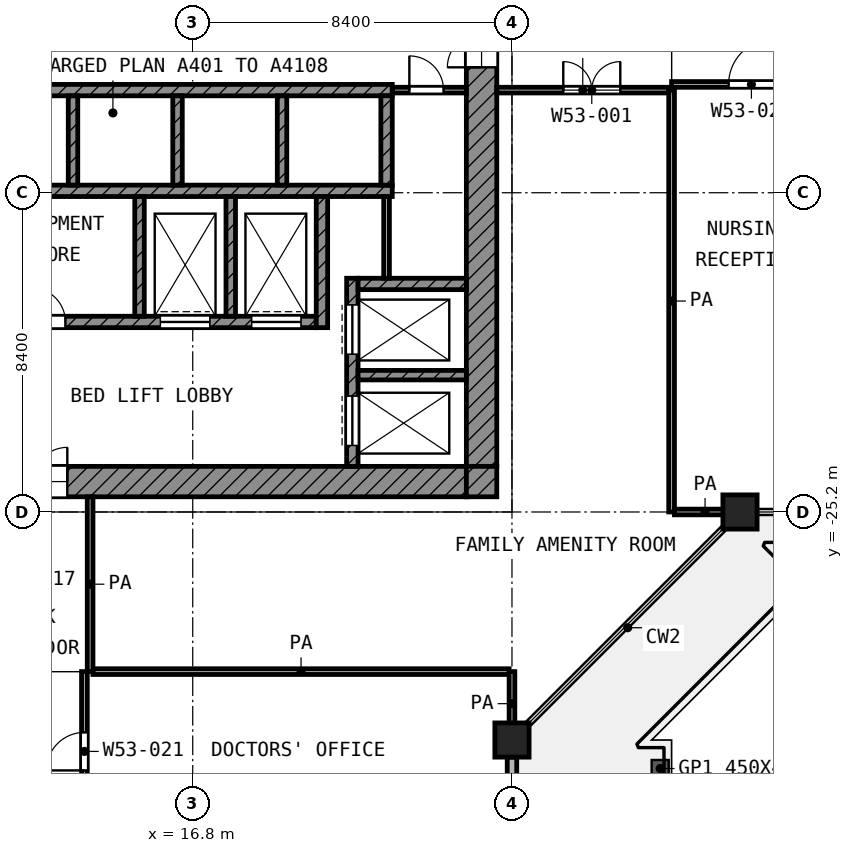
"""IFC4 building model, lengths in metres.
Left out: names, types, materials, properties, quantities, classifications, styles, units other than length and angle.
Written with IfcOpenShell. Run it as: python <this file> out.ifc"""

import sys

from ifc_helpers import new_model, si_unit, direction, frame, frame_2d, origin, origin_2d, place, context, subcontext, project, spatial, rectangle, extrude, element, fill, save


model = new_model("IFC4")
c1 = context("Model", 3, precision=1e-05, world=origin(), true_north=direction((0.0, 1.0)))
c2 = subcontext(c1, "Body", "Model", "MODEL_VIEW")
j1 = project(units=[si_unit("LENGTHUNIT", "METRE"), si_unit("PLANEANGLEUNIT", "RADIAN")], contexts=[c1])
p1 = place(None, origin())
s1 = spatial("IfcSite", under=j1, at=p1, CompositionType="ELEMENT")
p2 = place(p1, origin())
s2 = spatial("IfcBuilding", under=s1, at=p2, CompositionType="ELEMENT")
p3 = place(p2, frame((0.0, 0.0, 230.6)))
s3 = spatial("IfcBuildingStorey", under=s2, at=p3, CompositionType="ELEMENT", Elevation=230.6)
for number, where, z_axis, x_axis in (
    (1, (31.2, -25.2, 0.0), (0.0, 0.0, 1.0), (1.0, 0.0, 0.0)),
    (2, (25.2, -31.2, 0.0), (0.0, 0.0, 1.0), (1.0, 0.0, 0.0)),
):
    element("IfcColumn", number, at=place(p3, frame(where, z_axis=z_axis, x_axis=x_axis)), inside=s3, PredefinedType="COLUMN", context=c2, shape_type="SweptSolid", body=[
        extrude(rectangle(XDim=0.9, YDim=0.9, at=origin_2d()), origin(), (0.0, 0.0, 1.0), 4.2),
    ])
p4 = place(p3, frame((25.2, -35.7, 0.0), z_axis=(0.0, 0.0, 1.0), x_axis=(0.0, 1.0, 0.0)))
e3 = element("IfcWall", 3, at=p4, inside=s3, PredefinedType="SOLIDWALL", context=c2, shape_type="SweptSolid", body=[
    extrude(rectangle(XDim=4.05, YDim=0.25, at=frame_2d((2.025, 0.0))), origin(), (0.0, 0.0, 1.0), 2.58),
])
p5 = place(p4, frame((0.825, 0.0, 0.0)))
e4 = element("IfcOpeningElement", 4, at=p5, cuts=e3, PredefinedType="OPENING", context=c2, shape_type="SweptSolid", body=[
    extrude(rectangle(XDim=1.0, YDim=2.1, at=frame_2d((0.5, 1.05))), frame((0.0, 0.135, 0.0), z_axis=(0.0, -1.0, 0.0), x_axis=(1.0, 0.0, 0.0)), (0.0, 0.0, 1.0), 0.27),
])
p6 = place(p3, frame((24.4, -24.0, 0.0), z_axis=(0.0, 0.0, 1.0), x_axis=(0.0, 1.0, 0.0)))
e5 = element("IfcWall", 5, at=p6, inside=s3, PredefinedType="SHEAR", context=c2, shape_type="SweptSolid", body=[
    extrude(rectangle(XDim=18.6, YDim=0.8, at=frame_2d((9.3, 0.0))), origin(), (0.0, 0.0, 1.0), 3.6),
])
p7 = place(p6, frame((10.5, 0.0, 0.0)))
e6 = element("IfcOpeningElement", 6, at=p7, cuts=e5, PredefinedType="OPENING", context=c2, shape_type="SweptSolid", body=[
    extrude(rectangle(XDim=1.8, YDim=2.1, at=frame_2d((0.9, 1.05))), frame((0.0, 0.41, 0.0), z_axis=(0.0, -1.0, 0.0), x_axis=(1.0, 0.0, 0.0)), (0.0, 0.0, 1.0), 0.82),
])
p8 = place(p3, frame((5.4, -24.4, 0.0), z_axis=(0.0, 0.0, 1.0), x_axis=(1.0, 0.0, 0.0)))
e7 = element("IfcWall", 7, at=p8, inside=s3, PredefinedType="SHEAR", context=c2, shape_type="SweptSolid", body=[
    extrude(rectangle(XDim=18.6, YDim=0.8, at=frame_2d((9.3, 0.0))), origin(), (0.0, 0.0, 1.0), 3.6),
])
p9 = place(p8, frame((6.3, 0.0, 0.0)))
e8 = element("IfcOpeningElement", 8, at=p9, cuts=e7, PredefinedType="OPENING", context=c2, shape_type="SweptSolid", body=[
    extrude(rectangle(XDim=1.8, YDim=2.1, at=frame_2d((0.9, 1.05))), frame((0.0, 0.41, 0.0), z_axis=(0.0, -1.0, 0.0), x_axis=(1.0, 0.0, 0.0)), (0.0, 0.0, 1.0), 0.82),
])
p10 = place(p3, frame((24.4, -24.8, 0.0), z_axis=(0.0, 0.0, 1.0), x_axis=(0.0, 1.0, 0.0)))
e9 = element("IfcWall", 9, at=p10, inside=s3, PredefinedType="SHEAR", context=c2, shape_type="SweptSolid", body=[
    extrude(rectangle(XDim=0.8, YDim=0.8, at=frame_2d((0.4, 0.0))), origin(), (0.0, 0.0, 1.0), 3.6),
])
p11 = place(p3, frame((5.4, -14.1, 0.0), z_axis=(0.0, 0.0, 1.0), x_axis=(1.0, 0.0, 0.0)))
e10 = element("IfcWall", 10, at=p11, inside=s3, PredefinedType="SHEAR", context=c2, shape_type="SweptSolid", body=[
    extrude(rectangle(XDim=16.65, YDim=0.3, at=frame_2d((8.325, 0.0))), origin(), (0.0, 0.0, 1.0), 3.6),
])
p12 = place(p11, frame((0.825, 0.0, 0.0)))
e11 = element("IfcOpeningElement", 11, at=p12, cuts=e10, PredefinedType="OPENING", context=c2, shape_type="SweptSolid", body=[
    extrude(rectangle(XDim=1.1, YDim=2.1, at=frame_2d((0.55, 1.05))), frame((0.0, 0.16, 0.0), z_axis=(0.0, -1.0, 0.0), x_axis=(1.0, 0.0, 0.0)), (0.0, 0.0, 1.0), 0.32),
])
p13 = place(p11, frame((3.575, 0.0, 0.0)))
e12 = element("IfcOpeningElement", 12, at=p13, cuts=e10, PredefinedType="OPENING", context=c2, shape_type="SweptSolid", body=[
    extrude(rectangle(XDim=1.1, YDim=2.1, at=frame_2d((0.55, 1.05))), frame((0.0, 0.16, 0.0), z_axis=(0.0, -1.0, 0.0), x_axis=(1.0, 0.0, 0.0)), (0.0, 0.0, 1.0), 0.32),
])
p14 = place(p3, frame((5.4, -16.75, 0.0), z_axis=(0.0, 0.0, 1.0), x_axis=(1.0, 0.0, 0.0)))
e13 = element("IfcWall", 13, at=p14, inside=s3, PredefinedType="SHEAR", context=c2, shape_type="SweptSolid", body=[
    extrude(rectangle(XDim=16.65, YDim=0.3, at=frame_2d((8.325, 0.0))), origin(), (0.0, 0.0, 1.0), 3.6),
])
p15 = place(p3, frame((5.4, -20.2, 0.0), z_axis=(0.0, 0.0, 1.0), x_axis=(1.0, 0.0, 0.0)))
e14 = element("IfcWall", 14, at=p15, inside=s3, PredefinedType="SHEAR", context=c2, shape_type="SweptSolid", body=[
    extrude(rectangle(XDim=14.65, YDim=0.3, at=frame_2d((7.325, 0.0))), origin(), (0.0, 0.0, 1.0), 3.6),
])
p16 = place(p15, frame((10.55, 0.0, 0.0)))
e15 = element("IfcOpeningElement", 15, at=p16, cuts=e14, PredefinedType="OPENING", context=c2, shape_type="SweptSolid", body=[
    extrude(rectangle(XDim=1.3, YDim=2.1, at=frame_2d((0.65, 1.05))), frame((0.0, 0.16, 0.0), z_axis=(0.0, -1.0, 0.0), x_axis=(1.0, 0.0, 0.0)), (0.0, 0.0, 1.0), 0.32),
])
p17 = place(p15, frame((12.95, 0.0, 0.0)))
e16 = element("IfcOpeningElement", 16, at=p17, cuts=e14, PredefinedType="OPENING", context=c2, shape_type="SweptSolid", body=[
    extrude(rectangle(XDim=1.3, YDim=2.1, at=frame_2d((0.65, 1.05))), frame((0.0, 0.16, 0.0), z_axis=(0.0, -1.0, 0.0), x_axis=(1.0, 0.0, 0.0)), (0.0, 0.0, 1.0), 0.32),
])
p18 = place(p15, frame((0.55, 0.0, 0.0)))
e17 = element("IfcOpeningElement", 17, at=p18, cuts=e14, PredefinedType="OPENING", context=c2, shape_type="SweptSolid", body=[
    extrude(rectangle(XDim=1.3, YDim=2.1, at=frame_2d((0.65, 1.05))), frame((0.0, 0.16, 0.0), z_axis=(0.0, -1.0, 0.0), x_axis=(1.0, 0.0, 0.0)), (0.0, 0.0, 1.0), 0.32),
])
p19 = place(p15, frame((2.95, 0.0, 0.0)))
e18 = element("IfcOpeningElement", 18, at=p19, cuts=e14, PredefinedType="OPENING", context=c2, shape_type="SweptSolid", body=[
    extrude(rectangle(XDim=1.3, YDim=2.1, at=frame_2d((0.65, 1.05))), frame((0.0, 0.16, 0.0), z_axis=(0.0, -1.0, 0.0), x_axis=(1.0, 0.0, 0.0)), (0.0, 0.0, 1.0), 0.32),
])
p20 = place(p15, frame((7.15, 0.0, 0.0)))
e19 = element("IfcOpeningElement", 19, at=p20, cuts=e14, PredefinedType="OPENING", context=c2, shape_type="SweptSolid", body=[
    extrude(rectangle(XDim=0.9, YDim=2.1, at=frame_2d((0.45, 1.05))), frame((0.0, 0.16, 0.0), z_axis=(0.0, -1.0, 0.0), x_axis=(1.0, 0.0, 0.0)), (0.0, 0.0, 1.0), 0.32),
])
p21 = place(p3, frame((20.2, -20.35, 0.0), z_axis=(0.0, 0.0, 1.0), x_axis=(0.0, 1.0, 0.0)))
e20 = element("IfcWall", 20, at=p21, inside=s3, PredefinedType="SHEAR", context=c2, shape_type="SweptSolid", body=[
    extrude(rectangle(XDim=3.45, YDim=0.3, at=frame_2d((1.725, 0.0))), origin(), (0.0, 0.0, 1.0), 3.6),
])
p22 = place(p3, frame((21.9, -16.6, 0.0), z_axis=(0.0, 0.0, 1.0), x_axis=(0.0, 1.0, 0.0)))
e21 = element("IfcWall", 21, at=p22, inside=s3, PredefinedType="SHEAR", context=c2, shape_type="SweptSolid", body=[
    extrude(rectangle(XDim=2.35, YDim=0.3, at=frame_2d((1.175, 0.0))), origin(), (0.0, 0.0, 1.0), 3.6),
])
p23 = place(p3, frame((21.15, -19.2, 0.0), z_axis=(0.0, 0.0, 1.0), x_axis=(1.0, 0.0, 0.0)))
e22 = element("IfcWall", 22, at=p23, inside=s3, PredefinedType="SHEAR", context=c2, shape_type="SweptSolid", body=[
    extrude(rectangle(XDim=2.85, YDim=0.3, at=frame_2d((1.425, 0.0))), origin(), (0.0, 0.0, 1.0), 3.6),
])
p24 = place(p3, frame((21.0, -24.0, 0.0), z_axis=(0.0, 0.0, 1.0), x_axis=(0.0, 1.0, 0.0)))
e23 = element("IfcWall", 23, at=p24, inside=s3, PredefinedType="SHEAR", context=c2, shape_type="SweptSolid", body=[
    extrude(rectangle(XDim=4.95, YDim=0.3, at=frame_2d((2.475, 0.0))), origin(), (0.0, 0.0, 1.0), 3.6),
])
p25 = place(p24, frame((2.95, 0.0, 0.0)))
e24 = element("IfcOpeningElement", 24, at=p25, cuts=e23, PredefinedType="OPENING", context=c2, shape_type="SweptSolid", body=[
    extrude(rectangle(XDim=1.3, YDim=2.1, at=frame_2d((0.65, 1.05))), frame((0.0, 0.16, 0.0), z_axis=(0.0, -1.0, 0.0), x_axis=(1.0, 0.0, 0.0)), (0.0, 0.0, 1.0), 0.32),
])
p26 = place(p24, frame((0.55, 0.0, 0.0)))
e25 = element("IfcOpeningElement", 25, at=p26, cuts=e23, PredefinedType="OPENING", context=c2, shape_type="SweptSolid", body=[
    extrude(rectangle(XDim=1.3, YDim=2.1, at=frame_2d((0.65, 1.05))), frame((0.0, 0.16, 0.0), z_axis=(0.0, -1.0, 0.0), x_axis=(1.0, 0.0, 0.0)), (0.0, 0.0, 1.0), 0.32),
])
p27 = place(p3, frame((21.15, -21.6, 0.0), z_axis=(0.0, 0.0, 1.0), x_axis=(1.0, 0.0, 0.0)))
e26 = element("IfcWall", 26, at=p27, inside=s3, PredefinedType="SHEAR", context=c2, shape_type="SweptSolid", body=[
    extrude(rectangle(XDim=2.85, YDim=0.25, at=frame_2d((1.425, 0.0))), origin(), (0.0, 0.0, 1.0), 3.6),
])
for number, where, z_axis, x_axis in (
    (27, (15.4, -20.05, 0.0), (0.0, 0.0, 1.0), (0.0, 1.0, 0.0)),
    (28, (17.8, -20.05, 0.0), (0.0, 0.0, 1.0), (0.0, 1.0, 0.0)),
):
    element("IfcWall", number, at=place(p3, frame(where, z_axis=z_axis, x_axis=x_axis)), inside=s3, PredefinedType="SHEAR", context=c2, shape_type="SweptSolid", body=[
        extrude(rectangle(XDim=3.15, YDim=0.25, at=frame_2d((1.575, 0.0))), origin(), (0.0, 0.0, 1.0), 3.6),
    ])
for number, where, z_axis, x_axis in (
    (29, (13.65, -16.6, 0.0), (0.0, 0.0, 1.0), (0.0, 1.0, 0.0)),
    (30, (16.4, -16.6, 0.0), (0.0, 0.0, 1.0), (0.0, 1.0, 0.0)),
    (31, (19.15, -16.6, 0.0), (0.0, 0.0, 1.0), (0.0, 1.0, 0.0)),
):
    element("IfcWall", number, at=place(p3, frame(where, z_axis=z_axis, x_axis=x_axis)), inside=s3, PredefinedType="SHEAR", context=c2, shape_type="SweptSolid", body=[
        extrude(rectangle(XDim=2.35, YDim=0.25, at=frame_2d((1.175, 0.0))), origin(), (0.0, 0.0, 1.0), 3.6),
    ])
p28 = place(p3, frame((21.9, -19.05, 0.0), z_axis=(0.0, 0.0, 1.0), x_axis=(0.0, 1.0, 0.0)))
e32 = element("IfcWall", 32, at=p28, inside=s3, PredefinedType="PARTITIONING", context=c2, shape_type="SweptSolid", body=[
    extrude(rectangle(XDim=2.15, YDim=0.15, at=frame_2d((1.075, 0.0))), origin(), (0.0, 0.0, 1.0), 3.6),
])
p29 = place(p3, frame((22.05, -14.1, 0.0), z_axis=(0.0, 0.0, 1.0), x_axis=(1.0, 0.0, 0.0)))
e33 = element("IfcWall", 33, at=p29, inside=s3, PredefinedType="PARTITIONING", context=c2, shape_type="SweptSolid", body=[
    extrude(rectangle(XDim=1.95, YDim=0.15, at=frame_2d((0.975, 0.0))), origin(), (0.0, 0.0, 1.0), 3.6),
])
p30 = place(p29, frame((0.45, 0.0, 0.0)))
e34 = element("IfcOpeningElement", 34, at=p30, cuts=e33, PredefinedType="OPENING", context=c2, shape_type="SweptSolid", body=[
    extrude(rectangle(XDim=0.9, YDim=2.1, at=frame_2d((0.45, 1.05))), frame((0.0, 0.085, 0.0), z_axis=(0.0, -1.0, 0.0), x_axis=(1.0, 0.0, 0.0)), (0.0, 0.0, 1.0), 0.17),
])
p31 = place(p3, frame((14.175, -29.4, 0.0), z_axis=(0.0, 0.0, 1.0), x_axis=(1.0, 0.0, 0.0)))
e35 = element("IfcWall", 35, at=p31, inside=s3, PredefinedType="PARTITIONING", context=c2, shape_type="SweptSolid", body=[
    extrude(rectangle(XDim=10.95, YDim=0.15, at=frame_2d((5.475, 0.0))), origin(), (0.0, 0.0, 1.0), 3.6),
])
p32 = place(p3, frame((29.475, -25.2, 0.0), z_axis=(0.0, 0.0, 1.0), x_axis=(1.0, 0.0, 0.0)))
e36 = element("IfcWall", 36, at=p32, inside=s3, PredefinedType="PARTITIONING", context=c2, shape_type="SweptSolid", body=[
    extrude(rectangle(XDim=1.612, YDim=0.15, at=frame_2d((0.806, 0.0))), origin(), (0.0, 0.0, 1.0), 3.6),
])
p33 = place(p3, frame((24.8, -14.1, 0.0), z_axis=(0.0, 0.0, 1.0), x_axis=(1.0, 0.0, 0.0)))
e37 = element("IfcWall", 37, at=p33, inside=s3, PredefinedType="PARTITIONING", context=c2, shape_type="SweptSolid", body=[
    extrude(rectangle(XDim=4.525, YDim=0.15, at=frame_2d((2.262, 0.0))), origin(), (0.0, 0.0, 1.0), 3.6),
])
p34 = place(p33, frame((1.75, 0.0, 0.0)))
e38 = element("IfcOpeningElement", 38, at=p34, cuts=e37, PredefinedType="OPENING", context=c2, shape_type="SweptSolid", body=[
    extrude(rectangle(XDim=1.5, YDim=2.1, at=frame_2d((0.75, 1.05))), frame((0.0, 0.085, 0.0), z_axis=(0.0, -1.0, 0.0), x_axis=(1.0, 0.0, 0.0)), (0.0, 0.0, 1.0), 0.17),
])
p35 = place(p3, frame((29.4, -13.95, 0.0), z_axis=(0.0, 0.0, 1.0), x_axis=(1.0, 0.0, 0.0)))
e39 = element("IfcWall", 39, at=p35, inside=s3, PredefinedType="PARTITIONING", context=c2, shape_type="SweptSolid", body=[
    extrude(rectangle(XDim=33.52, YDim=0.15, at=frame_2d((16.76, 0.0))), origin(), (0.0, 0.0, 1.0), 2.7),
])
p36 = place(p35, frame((1.5, 0.0, 0.0)))
e40 = element("IfcOpeningElement", 40, at=p36, cuts=e39, PredefinedType="OPENING", context=c2, shape_type="SweptSolid", body=[
    extrude(rectangle(XDim=1.2, YDim=2.1, at=frame_2d((0.6, 1.05))), frame((0.0, 0.085, 0.0), z_axis=(0.0, -1.0, 0.0), x_axis=(1.0, 0.0, 0.0)), (0.0, 0.0, 1.0), 0.17),
])
p37 = place(p35, frame((6.1, 0.0, 0.0)))
e41 = element("IfcOpeningElement", 41, at=p37, cuts=e39, PredefinedType="OPENING", context=c2, shape_type="SweptSolid", body=[
    extrude(rectangle(XDim=1.0, YDim=2.1, at=frame_2d((0.5, 1.05))), frame((0.0, 0.085, 0.0), z_axis=(0.0, -1.0, 0.0), x_axis=(1.0, 0.0, 0.0)), (0.0, 0.0, 1.0), 0.17),
])
p38 = place(p35, frame((11.3, 0.0, 0.0)))
e42 = element("IfcOpeningElement", 42, at=p38, cuts=e39, PredefinedType="OPENING", context=c2, shape_type="SweptSolid", body=[
    extrude(rectangle(XDim=1.1, YDim=2.1, at=frame_2d((0.55, 1.05))), frame((0.0, 0.085, 0.0), z_axis=(0.0, -1.0, 0.0), x_axis=(1.0, 0.0, 0.0)), (0.0, 0.0, 1.0), 0.17),
])
p39 = place(p35, frame((13.0, 0.0, 0.0)))
e43 = element("IfcOpeningElement", 43, at=p39, cuts=e39, PredefinedType="OPENING", context=c2, shape_type="SweptSolid", body=[
    extrude(rectangle(XDim=1.2, YDim=2.1, at=frame_2d((0.6, 1.05))), frame((0.0, 0.085, 0.0), z_axis=(0.0, -1.0, 0.0), x_axis=(1.0, 0.0, 0.0)), (0.0, 0.0, 1.0), 0.17),
])
p40 = place(p35, frame((22.6, 0.0, 0.0)))
e44 = element("IfcOpeningElement", 44, at=p40, cuts=e39, PredefinedType="OPENING", context=c2, shape_type="SweptSolid", body=[
    extrude(rectangle(XDim=1.2, YDim=2.1, at=frame_2d((0.6, 1.05))), frame((0.0, 0.085, 0.0), z_axis=(0.0, -1.0, 0.0), x_axis=(1.0, 0.0, 0.0)), (0.0, 0.0, 1.0), 0.17),
])
p41 = place(p35, frame((20.3, 0.0, 0.0)))
e45 = element("IfcOpeningElement", 45, at=p41, cuts=e39, PredefinedType="OPENING", context=c2, shape_type="SweptSolid", body=[
    extrude(rectangle(XDim=1.2, YDim=2.1, at=frame_2d((0.6, 1.05))), frame((0.0, 0.085, 0.0), z_axis=(0.0, -1.0, 0.0), x_axis=(1.0, 0.0, 0.0)), (0.0, 0.0, 1.0), 0.17),
])
p42 = place(p35, frame((28.0, 0.0, 0.0)))
e46 = element("IfcOpeningElement", 46, at=p42, cuts=e39, PredefinedType="OPENING", context=c2, shape_type="SweptSolid", body=[
    extrude(rectangle(XDim=1.2, YDim=2.1, at=frame_2d((0.6, 1.05))), frame((0.0, 0.085, 0.0), z_axis=(0.0, -1.0, 0.0), x_axis=(1.0, 0.0, 0.0)), (0.0, 0.0, 1.0), 0.17),
])
p43 = place(p35, frame((31.0, 0.0, 0.0)))
e47 = element("IfcOpeningElement", 47, at=p43, cuts=e39, PredefinedType="OPENING", context=c2, shape_type="SweptSolid", body=[
    extrude(rectangle(XDim=1.0, YDim=2.1, at=frame_2d((0.5, 1.05))), frame((0.0, 0.085, 0.0), z_axis=(0.0, -1.0, 0.0), x_axis=(1.0, 0.0, 0.0)), (0.0, 0.0, 1.0), 0.17),
])
p44 = place(p3, frame((13.95, -46.12, 0.0), z_axis=(0.0, 0.0, 1.0), x_axis=(0.0, 1.0, 0.0)))
e48 = element("IfcWall", 48, at=p44, inside=s3, PredefinedType="PARTITIONING", context=c2, shape_type="SweptSolid", body=[
    extrude(rectangle(XDim=16.72, YDim=0.15, at=frame_2d((8.36, 0.0))), origin(), (0.0, 0.0, 1.0), 3.6),
])
p45 = place(p44, frame((14.12, 0.0, 0.0)))
e49 = element("IfcOpeningElement", 49, at=p45, cuts=e48, PredefinedType="OPENING", context=c2, shape_type="SweptSolid", body=[
    extrude(rectangle(XDim=1.0, YDim=2.1, at=frame_2d((0.5, 1.05))), frame((0.0, 0.085, 0.0), z_axis=(0.0, -1.0, 0.0), x_axis=(1.0, 0.0, 0.0)), (0.0, 0.0, 1.0), 0.17),
])
p46 = place(p44, frame((9.92, 0.0, 0.0)))
e50 = element("IfcOpeningElement", 50, at=p46, cuts=e48, PredefinedType="OPENING", context=c2, shape_type="SweptSolid", body=[
    extrude(rectangle(XDim=1.0, YDim=2.1, at=frame_2d((0.5, 1.05))), frame((0.0, 0.085, 0.0), z_axis=(0.0, -1.0, 0.0), x_axis=(1.0, 0.0, 0.0)), (0.0, 0.0, 1.0), 0.17),
])
p47 = place(p44, frame((3.37, 0.0, 0.0)))
e51 = element("IfcOpeningElement", 51, at=p47, cuts=e48, PredefinedType="OPENING", context=c2, shape_type="SweptSolid", body=[
    extrude(rectangle(XDim=1.5, YDim=2.1, at=frame_2d((0.75, 1.05))), frame((0.0, 0.085, 0.0), z_axis=(0.0, -1.0, 0.0), x_axis=(1.0, 0.0, 0.0)), (0.0, 0.0, 1.0), 0.17),
])
p48 = place(p3, frame((14.1, -29.4, 0.0), z_axis=(0.0, 0.0, 1.0), x_axis=(0.0, 1.0, 0.0)))
e52 = element("IfcWall", 52, at=p48, inside=s3, PredefinedType="PARTITIONING", context=c2, shape_type="SweptSolid", body=[
    extrude(rectangle(XDim=4.6, YDim=0.15, at=frame_2d((2.3, 0.0))), origin(), (0.0, 0.0, 1.0), 3.6),
])
p49 = place(p3, frame((25.2, -31.087, 0.0), z_axis=(0.0, 0.0, 1.0), x_axis=(0.0, 1.0, 0.0)))
e53 = element("IfcWall", 53, at=p49, inside=s3, PredefinedType="PARTITIONING", context=c2, shape_type="SweptSolid", body=[
    extrude(rectangle(XDim=1.687, YDim=0.15, at=frame_2d((0.844, 0.0))), origin(), (0.0, 0.0, 1.0), 3.6),
])
p50 = place(p3, frame((29.4, -25.2, 0.0), z_axis=(0.0, 0.0, 1.0), x_axis=(0.0, 1.0, 0.0)))
e54 = element("IfcWall", 54, at=p50, inside=s3, PredefinedType="PARTITIONING", context=c2, shape_type="SweptSolid", body=[
    extrude(rectangle(XDim=11.1, YDim=0.15, at=frame_2d((5.55, 0.0))), origin(), (0.0, 0.0, 1.0), 3.6),
])
p51 = place(p25, origin())
e55 = element("IfcDoor", 55, at=p51, inside=s3, OperationType="DOUBLE_DOOR_SLIDING", PredefinedType="DOOR", context=c2, shape_type="SweptSolid", body=[
    extrude(rectangle(XDim=1.3, YDim=2.1, at=frame_2d((0.65, 1.05))), frame((0.0, 0.025, 0.0), z_axis=(0.0, -1.0, 0.0), x_axis=(1.0, 0.0, 0.0)), (0.0, 0.0, 1.0), 0.05),
])
fill(e24, e55)
p52 = place(p26, origin())
e56 = element("IfcDoor", 56, at=p52, inside=s3, OperationType="DOUBLE_DOOR_SLIDING", PredefinedType="DOOR", context=c2, shape_type="SweptSolid", body=[
    extrude(rectangle(XDim=1.3, YDim=2.1, at=frame_2d((0.65, 1.05))), frame((0.0, 0.025, 0.0), z_axis=(0.0, -1.0, 0.0), x_axis=(1.0, 0.0, 0.0)), (0.0, 0.0, 1.0), 0.05),
])
fill(e25, e56)
p53 = place(p16, origin())
e57 = element("IfcDoor", 57, at=p53, inside=s3, OperationType="DOUBLE_DOOR_SLIDING", PredefinedType="DOOR", context=c2, shape_type="SweptSolid", body=[
    extrude(rectangle(XDim=1.3, YDim=2.1, at=frame_2d((0.65, 1.05))), frame((0.0, 0.025, 0.0), z_axis=(0.0, -1.0, 0.0), x_axis=(1.0, 0.0, 0.0)), (0.0, 0.0, 1.0), 0.05),
])
fill(e15, e57)
p54 = place(p17, origin())
e58 = element("IfcDoor", 58, at=p54, inside=s3, OperationType="DOUBLE_DOOR_SLIDING", PredefinedType="DOOR", context=c2, shape_type="SweptSolid", body=[
    extrude(rectangle(XDim=1.3, YDim=2.1, at=frame_2d((0.65, 1.05))), frame((0.0, 0.025, 0.0), z_axis=(0.0, -1.0, 0.0), x_axis=(1.0, 0.0, 0.0)), (0.0, 0.0, 1.0), 0.05),
])
fill(e16, e58)
p55 = place(p7, origin())
e59 = element("IfcDoor", 59, at=p55, inside=s3, OperationType="DOUBLE_DOOR_SINGLE_SWING", PredefinedType="DOOR", context=c2, shape_type="SweptSolid", body=[
    extrude(rectangle(XDim=1.8, YDim=2.1, at=frame_2d((0.9, 1.05))), frame((0.0, 0.025, 0.0), z_axis=(0.0, -1.0, 0.0), x_axis=(1.0, 0.0, 0.0)), (0.0, 0.0, 1.0), 0.05),
])
fill(e6, e59)
p56 = place(p9, origin())
e60 = element("IfcDoor", 60, at=p56, inside=s3, OperationType="DOUBLE_DOOR_SINGLE_SWING", PredefinedType="DOOR", context=c2, shape_type="SweptSolid", body=[
    extrude(rectangle(XDim=1.8, YDim=2.1, at=frame_2d((0.9, 1.05))), frame((0.0, 0.025, 0.0), z_axis=(0.0, -1.0, 0.0), x_axis=(1.0, 0.0, 0.0)), (0.0, 0.0, 1.0), 0.05),
])
fill(e8, e60)
p57 = place(p30, origin())
e61 = element("IfcDoor", 61, at=p57, inside=s3, OperationType="SINGLE_SWING_LEFT", PredefinedType="DOOR", context=c2, shape_type="SweptSolid", body=[
    extrude(rectangle(XDim=0.9, YDim=2.1, at=frame_2d((0.45, 1.05))), frame((0.0, 0.025, 0.0), z_axis=(0.0, -1.0, 0.0), x_axis=(1.0, 0.0, 0.0)), (0.0, 0.0, 1.0), 0.05),
])
fill(e34, e61)
p58 = place(p20, origin())
e62 = element("IfcDoor", 62, at=p58, inside=s3, OperationType="SINGLE_SWING_LEFT", PredefinedType="DOOR", context=c2, shape_type="SweptSolid", body=[
    extrude(rectangle(XDim=0.9, YDim=2.1, at=frame_2d((0.45, 1.05))), frame((0.0, 0.025, 0.0), z_axis=(0.0, -1.0, 0.0), x_axis=(1.0, 0.0, 0.0)), (0.0, 0.0, 1.0), 0.05),
])
fill(e19, e62)
p59 = place(p34, origin())
e63 = element("IfcDoor", 63, at=p59, inside=s3, OperationType="DOUBLE_DOOR_SINGLE_SWING", PredefinedType="DOOR", context=c2, shape_type="SweptSolid", body=[
    extrude(rectangle(XDim=1.5, YDim=2.1, at=frame_2d((0.75, 1.05))), frame((0.0, 0.025, 0.0), z_axis=(0.0, -1.0, 0.0), x_axis=(1.0, 0.0, 0.0)), (0.0, 0.0, 1.0), 0.05),
])
fill(e38, e63)
p60 = place(p36, origin())
e64 = element("IfcDoor", 64, at=p60, inside=s3, OperationType="SINGLE_SWING_RIGHT", PredefinedType="DOOR", context=c2, shape_type="SweptSolid", body=[
    extrude(rectangle(XDim=1.2, YDim=2.1, at=frame_2d((0.6, 1.05))), frame((0.0, 0.025, 0.0), z_axis=(0.0, -1.0, 0.0), x_axis=(1.0, 0.0, 0.0)), (0.0, 0.0, 1.0), 0.05),
])
fill(e40, e64)
p61 = place(p45, origin())
e65 = element("IfcDoor", 65, at=p61, inside=s3, OperationType="SINGLE_SWING_LEFT", PredefinedType="DOOR", context=c2, shape_type="SweptSolid", body=[
    extrude(rectangle(XDim=1.0, YDim=2.1, at=frame_2d((0.5, 1.05))), frame((0.0, 0.025, 0.0), z_axis=(0.0, -1.0, 0.0), x_axis=(1.0, 0.0, 0.0)), (0.0, 0.0, 1.0), 0.05),
])
fill(e49, e65)
save(model, sys.argv[1])
